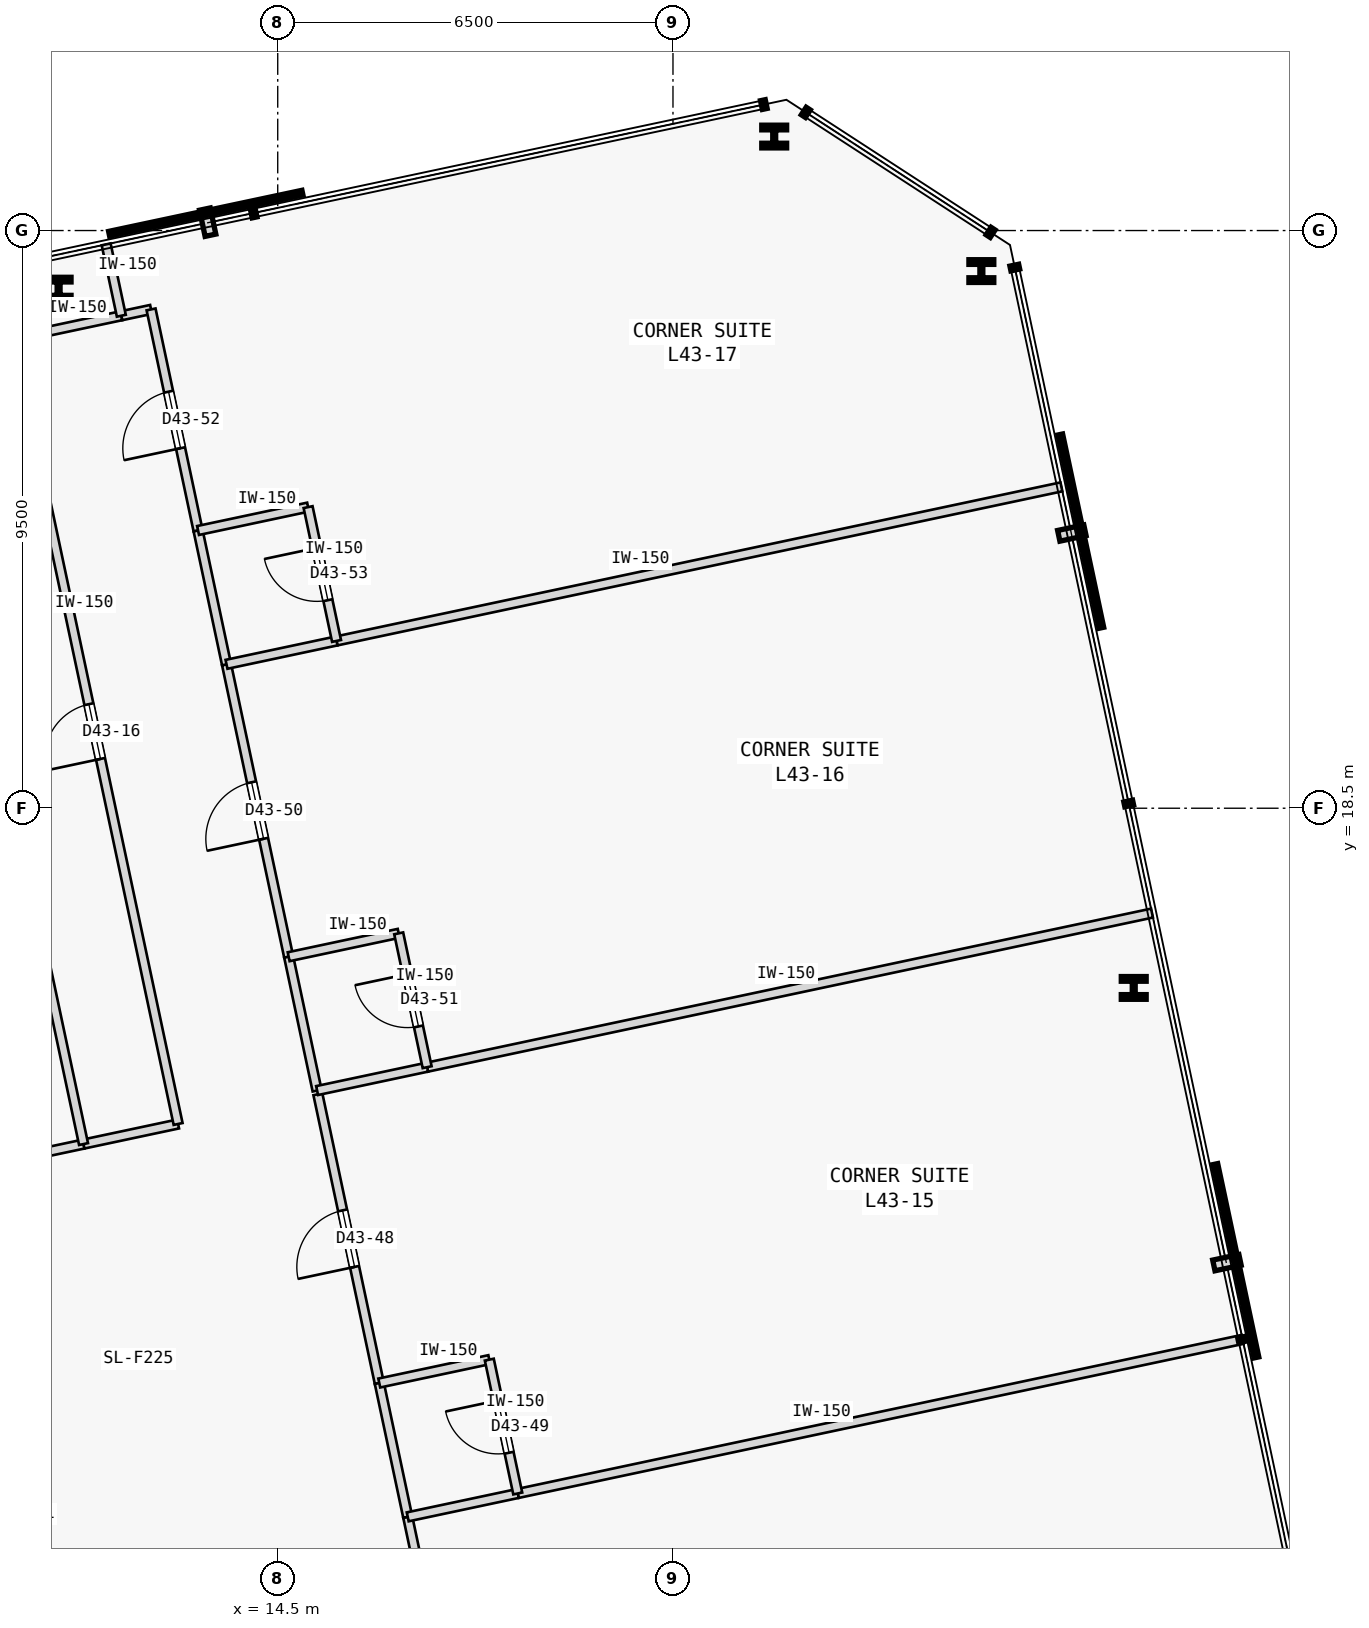
"""IFC4 building model, lengths in metres.
Left out: names, types, materials, properties, quantities, classifications, styles, units other than length and angle.
Written with IfcOpenShell. Run it as: python <this file> out.ifc"""

import sys

from ifc_helpers import new_model, si_unit, direction, frame, frame_2d, origin, origin_2d, place, context, subcontext, project, spatial, rectangle, i_section, extrude, element, fill, save


model = new_model("IFC4")
c1 = context("Model", 3, precision=1e-05, world=origin(), true_north=direction((0.0, 1.0)))
c2 = subcontext(c1, "Body", "Model", "MODEL_VIEW")
j1 = project(units=[si_unit("LENGTHUNIT", "METRE"), si_unit("PLANEANGLEUNIT", "RADIAN")], contexts=[c1])
p1 = place(None, origin())
s1 = spatial("IfcSite", under=j1, at=p1, CompositionType="ELEMENT")
p2 = place(p1, origin())
s2 = spatial("IfcBuilding", under=s1, at=p2, CompositionType="ELEMENT")
p3 = place(p2, frame((0.0, 0.0, 168.4)))
s3 = spatial("IfcBuildingStorey", under=s2, at=p3, CompositionType="ELEMENT", Elevation=168.4)
for number, where, z_axis, x_axis in (
    (1, (28.577, 15.545, 0.0), (0.0, 0.0, 1.0), (1.0, 0.0, 0.0)),
    (2, (26.071, 27.333, 0.0), (0.0, 0.0, 1.0), (1.0, 0.0, 0.0)),
    (3, (22.665, 29.546, 0.0), (0.0, 0.0, 1.0), (1.0, 0.0, 0.0)),
    (4, (10.896, 27.044, 0.0), (0.0, 0.0, 1.0), (1.0, 0.0, 0.0)),
):
    element("IfcColumn", number, at=place(p3, frame(where, z_axis=z_axis, x_axis=x_axis)), inside=s3, PredefinedType="COLUMN", context=c2, shape_type="SweptSolid", body=[
        extrude(i_section(OverallWidth=0.409, OverallDepth=0.374, WebThickness=0.048, FlangeThickness=0.077, FilletRadius=0.015, at=origin_2d()), origin(), (0.0, 0.0, 1.0), 3.4),
    ])
p4 = place(p3, frame((7.943, 12.262, 0.0), z_axis=(0.0, 0.0, 1.0), x_axis=(0.978144956759, 0.207924129352, 0.0)))
e5 = element("IfcWall", 5, at=p4, inside=s3, PredefinedType="PARTITIONING", context=c2, shape_type="SweptSolid", body=[
    extrude(rectangle(XDim=3.439, YDim=0.15, at=frame_2d((1.72, 0.0))), origin(), (0.0, 0.0, 1.0), 3.175),
])
p5 = place(p4, frame((1.26, 0.0, 0.0)))
e6 = element("IfcOpeningElement", 6, at=p5, cuts=e5, PredefinedType="OPENING", context=c2, shape_type="SweptSolid", body=[
    extrude(rectangle(XDim=0.92, YDim=2.15, at=frame_2d((0.46, 1.075))), frame((0.0, 0.085, 0.0), z_axis=(0.0, -1.0, 0.0), x_axis=(1.0, 0.0, 0.0)), (0.0, 0.0, 1.0), 0.17),
])
p6 = place(p3, frame((11.307, 12.977, 0.0), z_axis=(0.0, 0.0, 1.0), x_axis=(0.97817836016, 0.20776692642, 0.0)))
e7 = element("IfcWall", 7, at=p6, inside=s3, PredefinedType="PARTITIONING", context=c2, shape_type="SweptSolid", body=[
    extrude(rectangle(XDim=1.59, YDim=0.15, at=frame_2d((0.795, 0.0))), origin(), (0.0, 0.0, 1.0), 3.175),
])
p7 = place(p3, frame((12.862, 13.308, 0.0), z_axis=(0.0, 0.0, 1.0), x_axis=(-0.207911421929, 0.978147657888, 0.0)))
e8 = element("IfcWall", 8, at=p7, inside=s3, PredefinedType="PARTITIONING", context=c2, shape_type="SweptSolid", body=[
    extrude(rectangle(XDim=13.195, YDim=0.15, at=frame_2d((6.598, 0.0))), origin(), (0.0, 0.0, 1.0), 3.175),
])
p8 = place(p7, frame((6.137, 0.0, 0.0)))
e9 = element("IfcOpeningElement", 9, at=p8, cuts=e8, PredefinedType="OPENING", context=c2, shape_type="SweptSolid", body=[
    extrude(rectangle(XDim=0.92, YDim=2.15, at=frame_2d((0.46, 1.075))), frame((0.0, 0.085, 0.0), z_axis=(0.0, -1.0, 0.0), x_axis=(1.0, 0.0, 0.0)), (0.0, 0.0, 1.0), 0.17),
])
p9 = place(p3, frame((10.118, 26.214, 0.0), z_axis=(0.0, 0.0, 1.0), x_axis=(0.978133353907, 0.20797870558, 0.0)))
e10 = element("IfcWall", 10, at=p9, inside=s3, PredefinedType="PARTITIONING", context=c2, shape_type="SweptSolid", body=[
    extrude(rectangle(XDim=1.85, YDim=0.15, at=frame_2d((0.925, 0.0))), origin(), (0.0, 0.0, 1.0), 3.175),
])
p10 = place(p3, frame((17.66, 2.037, 0.0), z_axis=(0.0, 0.0, 1.0), x_axis=(-0.207894386012, 0.978151278824, 0.0)))
e11 = element("IfcWall", 11, at=p10, inside=s3, PredefinedType="PARTITIONING", context=c2, shape_type="SweptSolid", body=[
    extrude(rectangle(XDim=4.917, YDim=0.15, at=frame_2d((2.458, 0.0))), origin(), (0.0, 0.0, 1.0), 3.175),
])
p11 = place(p10, frame((1.246, 0.0, 0.0)))
e12 = element("IfcOpeningElement", 12, at=p11, cuts=e11, PredefinedType="OPENING", context=c2, shape_type="SweptSolid", body=[
    extrude(rectangle(XDim=0.95, YDim=2.15, at=frame_2d((0.475, 1.075))), frame((0.0, 0.085, 0.0), z_axis=(0.0, -1.0, 0.0), x_axis=(1.0, 0.0, 0.0)), (0.0, 0.0, 1.0), 0.17),
])
p12 = place(p3, frame((16.17, 9.047, 0.0), z_axis=(0.0, 0.0, 1.0), x_axis=(-0.20792851832, 0.978144023787, 0.0)))
e13 = element("IfcWall", 13, at=p12, inside=s3, PredefinedType="PARTITIONING", context=c2, shape_type="SweptSolid", body=[
    extrude(rectangle(XDim=4.855, YDim=0.15, at=frame_2d((2.428, 0.0))), origin(), (0.0, 0.0, 1.0), 3.175),
])
p13 = place(p12, frame((1.952, 0.0, 0.0)))
e14 = element("IfcOpeningElement", 14, at=p13, cuts=e13, PredefinedType="OPENING", context=c2, shape_type="SweptSolid", body=[
    extrude(rectangle(XDim=0.95, YDim=2.15, at=frame_2d((0.475, 1.075))), frame((0.0, 0.085, 0.0), z_axis=(0.0, -1.0, 0.0), x_axis=(1.0, 0.0, 0.0)), (0.0, 0.0, 1.0), 0.17),
])
p14 = place(p3, frame((16.638, 6.847, 0.0), z_axis=(0.0, 0.0, 1.0), x_axis=(-0.207913264065, 0.978147266328, 0.0)))
e15 = element("IfcWall", 15, at=p14, inside=s3, PredefinedType="PARTITIONING", context=c2, shape_type="SweptSolid", body=[
    extrude(rectangle(XDim=2.25, YDim=0.15, at=frame_2d((1.125, 0.0))), origin(), (0.0, 0.0, 1.0), 3.175),
])
p15 = place(p3, frame((14.68, 16.058, 0.0), z_axis=(0.0, 0.0, 1.0), x_axis=(-0.207887265829, 0.978152792107, 0.0)))
e16 = element("IfcWall", 16, at=p15, inside=s3, PredefinedType="PARTITIONING", context=c2, shape_type="SweptSolid", body=[
    extrude(rectangle(XDim=4.916, YDim=0.15, at=frame_2d((2.458, 0.0))), origin(), (0.0, 0.0, 1.0), 3.175),
])
p16 = place(p15, frame((1.983, 0.0, 0.0)))
e17 = element("IfcOpeningElement", 17, at=p16, cuts=e16, PredefinedType="OPENING", context=c2, shape_type="SweptSolid", body=[
    extrude(rectangle(XDim=0.95, YDim=2.15, at=frame_2d((0.475, 1.075))), frame((0.0, 0.085, 0.0), z_axis=(0.0, -1.0, 0.0), x_axis=(1.0, 0.0, 0.0)), (0.0, 0.0, 1.0), 0.17),
])
p17 = place(p3, frame((15.148, 13.857, 0.0), z_axis=(0.0, 0.0, 1.0), x_axis=(-0.207995007687, 0.978129887478, 0.0)))
e18 = element("IfcWall", 18, at=p17, inside=s3, PredefinedType="PARTITIONING", context=c2, shape_type="SweptSolid", body=[
    extrude(rectangle(XDim=2.25, YDim=0.15, at=frame_2d((1.125, 0.0))), origin(), (0.0, 0.0, 1.0), 3.175),
])
p18 = place(p3, frame((11.928, 26.599, 0.0), z_axis=(0.0, 0.0, 1.0), x_axis=(0.97822210712, 0.207560856478, 0.0)))
e19 = element("IfcWall", 19, at=p18, inside=s3, PredefinedType="PARTITIONING", context=c2, shape_type="SweptSolid", body=[
    extrude(rectangle(XDim=0.5, YDim=0.15, at=frame_2d((0.25, 0.0))), origin(), (0.0, 0.0, 1.0), 3.175),
])
p19 = place(p3, frame((13.19, 23.067, 0.0), z_axis=(0.0, 0.0, 1.0), x_axis=(-0.207949879289, 0.978139482745, 0.0)))
e20 = element("IfcWall", 20, at=p19, inside=s3, PredefinedType="PARTITIONING", context=c2, shape_type="SweptSolid", body=[
    extrude(rectangle(XDim=3.717, YDim=0.15, at=frame_2d((1.858, 0.0))), origin(), (0.0, 0.0, 1.0), 3.175),
])
p20 = place(p19, frame((1.384, 0.0, 0.0)))
e21 = element("IfcOpeningElement", 21, at=p20, cuts=e20, PredefinedType="OPENING", context=c2, shape_type="SweptSolid", body=[
    extrude(rectangle(XDim=0.95, YDim=2.15, at=frame_2d((0.475, 1.075))), frame((0.0, 0.085, 0.0), z_axis=(0.0, -1.0, 0.0), x_axis=(1.0, 0.0, 0.0)), (0.0, 0.0, 1.0), 0.17),
])
p21 = place(p3, frame((13.658, 20.866, 0.0), z_axis=(0.0, 0.0, 1.0), x_axis=(-0.207913264065, 0.978147266328, 0.0)))
e22 = element("IfcWall", 22, at=p21, inside=s3, PredefinedType="PARTITIONING", context=c2, shape_type="SweptSolid", body=[
    extrude(rectangle(XDim=2.25, YDim=0.15, at=frame_2d((1.125, 0.0))), origin(), (0.0, 0.0, 1.0), 3.175),
])
p22 = place(p3, frame((11.307, 12.977, 0.0), z_axis=(0.0, 0.0, 1.0), x_axis=(-0.207915348705, 0.978146823219, 0.0)))
e23 = element("IfcWall", 23, at=p22, inside=s3, PredefinedType="PARTITIONING", context=c2, shape_type="SweptSolid", body=[
    extrude(rectangle(XDim=14.395, YDim=0.15, at=frame_2d((7.197, 0.0))), origin(), (0.0, 0.0, 1.0), 3.175),
])
p23 = place(p3, frame((11.928, 26.599, 0.0), z_axis=(0.0, 0.0, 1.0), x_axis=(-0.20795853359, 0.978137642823, 0.0)))
e24 = element("IfcWall", 24, at=p23, inside=s3, PredefinedType="PARTITIONING", context=c2, shape_type="SweptSolid", body=[
    extrude(rectangle(XDim=1.2, YDim=0.15, at=frame_2d((0.6, 0.0))), origin(), (0.0, 0.0, 1.0), 3.175),
])
p24 = place(p3, frame((18.447, 7.231, 0.0), z_axis=(0.0, 0.0, 1.0), x_axis=(0.978149634612, 0.207902121941, 0.0)))
e25 = element("IfcWall", 25, at=p24, inside=s3, PredefinedType="PARTITIONING", context=c2, shape_type="SweptSolid", body=[
    extrude(rectangle(XDim=12.187, YDim=0.15, at=frame_2d((6.094, 0.0))), origin(), (0.0, 0.0, 1.0), 3.175),
])
p25 = place(p3, frame((16.638, 6.847, 0.0), z_axis=(0.0, 0.0, 1.0), x_axis=(0.978160192495, 0.207852442415, 0.0)))
e26 = element("IfcWall", 26, at=p25, inside=s3, PredefinedType="PARTITIONING", context=c2, shape_type="SweptSolid", body=[
    extrude(rectangle(XDim=1.85, YDim=0.15, at=frame_2d((0.925, 0.0))), origin(), (0.0, 0.0, 1.0), 3.175),
])
p26 = place(p3, frame((16.17, 9.047, 0.0), z_axis=(0.0, 0.0, 1.0), x_axis=(0.978133353907, 0.20797870558, 0.0)))
e27 = element("IfcWall", 27, at=p26, inside=s3, PredefinedType="PARTITIONING", context=c2, shape_type="SweptSolid", body=[
    extrude(rectangle(XDim=1.85, YDim=0.15, at=frame_2d((0.925, 0.0))), origin(), (0.0, 0.0, 1.0), 3.175),
])
p27 = place(p3, frame((18.447, 7.231, 0.0), z_axis=(0.0, 0.0, 1.0), x_axis=(-0.207891197838, 0.978151956427, 0.0)))
e28 = element("IfcWall", 28, at=p27, inside=s3, PredefinedType="PARTITIONING", context=c2, shape_type="SweptSolid", body=[
    extrude(rectangle(XDim=2.25, YDim=0.15, at=frame_2d((1.125, 0.0))), origin(), (0.0, 0.0, 1.0), 3.175),
])
p28 = place(p27, frame((0.685, 0.0, 0.0)))
e29 = element("IfcOpeningElement", 29, at=p28, cuts=e28, PredefinedType="OPENING", context=c2, shape_type="SweptSolid", body=[
    extrude(rectangle(XDim=0.88, YDim=2.15, at=frame_2d((0.44, 1.075))), frame((0.0, 0.085, 0.0), z_axis=(0.0, -1.0, 0.0), x_axis=(1.0, 0.0, 0.0)), (0.0, 0.0, 1.0), 0.17),
])
p29 = place(p3, frame((16.957, 14.242, 0.0), z_axis=(0.0, 0.0, 1.0), x_axis=(0.978148768696, 0.207906195911, 0.0)))
e30 = element("IfcWall", 30, at=p29, inside=s3, PredefinedType="PARTITIONING", context=c2, shape_type="SweptSolid", body=[
    extrude(rectangle(XDim=12.187, YDim=0.15, at=frame_2d((6.093, 0.0))), origin(), (0.0, 0.0, 1.0), 3.175),
])
for number, where, z_axis, x_axis in (
    (31, (15.148, 13.857, 0.0), (0.0, 0.0, 1.0), (0.978, 0.208, 0.0)),
    (32, (14.68, 16.058, 0.0), (0.0, 0.0, 1.0), (0.978, 0.208, 0.0)),
):
    element("IfcWall", number, at=place(p3, frame(where, z_axis=z_axis, x_axis=x_axis)), inside=s3, PredefinedType="PARTITIONING", context=c2, shape_type="SweptSolid", body=[
        extrude(rectangle(XDim=1.85, YDim=0.15, at=frame_2d((0.925, 0.0))), origin(), (0.0, 0.0, 1.0), 3.175),
    ])
p30 = place(p3, frame((16.957, 14.242, 0.0), z_axis=(0.0, 0.0, 1.0), x_axis=(-0.207913264065, 0.978147266328, 0.0)))
e33 = element("IfcWall", 33, at=p30, inside=s3, PredefinedType="PARTITIONING", context=c2, shape_type="SweptSolid", body=[
    extrude(rectangle(XDim=2.25, YDim=0.15, at=frame_2d((1.125, 0.0))), origin(), (0.0, 0.0, 1.0), 3.175),
])
p31 = place(p30, frame((0.685, 0.0, 0.0)))
e34 = element("IfcOpeningElement", 34, at=p31, cuts=e33, PredefinedType="OPENING", context=c2, shape_type="SweptSolid", body=[
    extrude(rectangle(XDim=0.88, YDim=2.15, at=frame_2d((0.44, 1.075))), frame((0.0, 0.085, 0.0), z_axis=(0.0, -1.0, 0.0), x_axis=(1.0, 0.0, 0.0)), (0.0, 0.0, 1.0), 0.17),
])
p32 = place(p3, frame((15.467, 21.251, 0.0), z_axis=(0.0, 0.0, 1.0), x_axis=(0.97814556055, 0.207921288896, 0.0)))
e35 = element("IfcWall", 35, at=p32, inside=s3, PredefinedType="PARTITIONING", context=c2, shape_type="SweptSolid", body=[
    extrude(rectangle(XDim=12.187, YDim=0.15, at=frame_2d((6.094, 0.0))), origin(), (0.0, 0.0, 1.0), 3.175),
])
p33 = place(p3, frame((13.658, 20.866, 0.0), z_axis=(0.0, 0.0, 1.0), x_axis=(0.978160192495, 0.207852442415, 0.0)))
e36 = element("IfcWall", 36, at=p33, inside=s3, PredefinedType="PARTITIONING", context=c2, shape_type="SweptSolid", body=[
    extrude(rectangle(XDim=1.85, YDim=0.15, at=frame_2d((0.925, 0.0))), origin(), (0.0, 0.0, 1.0), 3.175),
])
p34 = place(p3, frame((13.19, 23.067, 0.0), z_axis=(0.0, 0.0, 1.0), x_axis=(0.978133353907, 0.20797870558, 0.0)))
e37 = element("IfcWall", 37, at=p34, inside=s3, PredefinedType="PARTITIONING", context=c2, shape_type="SweptSolid", body=[
    extrude(rectangle(XDim=1.85, YDim=0.15, at=frame_2d((0.925, 0.0))), origin(), (0.0, 0.0, 1.0), 3.175),
])
p35 = place(p3, frame((15.467, 21.251, 0.0), z_axis=(0.0, 0.0, 1.0), x_axis=(-0.207891197838, 0.978151956427, 0.0)))
e38 = element("IfcWall", 38, at=p35, inside=s3, PredefinedType="PARTITIONING", context=c2, shape_type="SweptSolid", body=[
    extrude(rectangle(XDim=2.25, YDim=0.15, at=frame_2d((1.125, 0.0))), origin(), (0.0, 0.0, 1.0), 3.175),
])
p36 = place(p35, frame((0.685, 0.0, 0.0)))
e39 = element("IfcOpeningElement", 39, at=p36, cuts=e38, PredefinedType="OPENING", context=c2, shape_type="SweptSolid", body=[
    extrude(rectangle(XDim=0.88, YDim=2.15, at=frame_2d((0.44, 1.075))), frame((0.0, 0.085, 0.0), z_axis=(0.0, -1.0, 0.0), x_axis=(1.0, 0.0, 0.0)), (0.0, 0.0, 1.0), 0.17),
])
p37 = place(p8, origin())
e40 = element("IfcDoor", 40, at=p37, inside=s3, OperationType="SINGLE_SWING_LEFT", PredefinedType="DOOR", context=c2, shape_type="SweptSolid", body=[
    extrude(rectangle(XDim=0.92, YDim=2.15, at=frame_2d((0.46, 1.075))), frame((0.0, 0.025, 0.0), z_axis=(0.0, -1.0, 0.0), x_axis=(1.0, 0.0, 0.0)), (0.0, 0.0, 1.0), 0.05),
])
fill(e9, e40)
p38 = place(p13, origin())
e41 = element("IfcDoor", 41, at=p38, inside=s3, OperationType="SINGLE_SWING_LEFT", PredefinedType="DOOR", context=c2, shape_type="SweptSolid", body=[
    extrude(rectangle(XDim=0.95, YDim=2.15, at=frame_2d((0.475, 1.075))), frame((0.0, 0.025, 0.0), z_axis=(0.0, -1.0, 0.0), x_axis=(1.0, 0.0, 0.0)), (0.0, 0.0, 1.0), 0.05),
])
fill(e14, e41)
p39 = place(p28, origin())
e42 = element("IfcDoor", 42, at=p39, inside=s3, OperationType="SINGLE_SWING_RIGHT", PredefinedType="DOOR", context=c2, shape_type="SweptSolid", body=[
    extrude(rectangle(XDim=0.88, YDim=2.15, at=frame_2d((0.44, 1.075))), frame((0.0, 0.025, 0.0), z_axis=(0.0, -1.0, 0.0), x_axis=(1.0, 0.0, 0.0)), (0.0, 0.0, 1.0), 0.05),
])
fill(e29, e42)
p40 = place(p16, origin())
e43 = element("IfcDoor", 43, at=p40, inside=s3, OperationType="SINGLE_SWING_LEFT", PredefinedType="DOOR", context=c2, shape_type="SweptSolid", body=[
    extrude(rectangle(XDim=0.95, YDim=2.15, at=frame_2d((0.475, 1.075))), frame((0.0, 0.025, 0.0), z_axis=(0.0, -1.0, 0.0), x_axis=(1.0, 0.0, 0.0)), (0.0, 0.0, 1.0), 0.05),
])
fill(e17, e43)
p41 = place(p31, origin())
e44 = element("IfcDoor", 44, at=p41, inside=s3, OperationType="SINGLE_SWING_RIGHT", PredefinedType="DOOR", context=c2, shape_type="SweptSolid", body=[
    extrude(rectangle(XDim=0.88, YDim=2.15, at=frame_2d((0.44, 1.075))), frame((0.0, 0.025, 0.0), z_axis=(0.0, -1.0, 0.0), x_axis=(1.0, 0.0, 0.0)), (0.0, 0.0, 1.0), 0.05),
])
fill(e34, e44)
p42 = place(p20, origin())
e45 = element("IfcDoor", 45, at=p42, inside=s3, OperationType="SINGLE_SWING_LEFT", PredefinedType="DOOR", context=c2, shape_type="SweptSolid", body=[
    extrude(rectangle(XDim=0.95, YDim=2.15, at=frame_2d((0.475, 1.075))), frame((0.0, 0.025, 0.0), z_axis=(0.0, -1.0, 0.0), x_axis=(1.0, 0.0, 0.0)), (0.0, 0.0, 1.0), 0.05),
])
fill(e21, e45)
p43 = place(p36, origin())
e46 = element("IfcDoor", 46, at=p43, inside=s3, OperationType="SINGLE_SWING_RIGHT", PredefinedType="DOOR", context=c2, shape_type="SweptSolid", body=[
    extrude(rectangle(XDim=0.88, YDim=2.15, at=frame_2d((0.44, 1.075))), frame((0.0, 0.025, 0.0), z_axis=(0.0, -1.0, 0.0), x_axis=(1.0, 0.0, 0.0)), (0.0, 0.0, 1.0), 0.05),
])
fill(e39, e46)
save(model, sys.argv[1])
